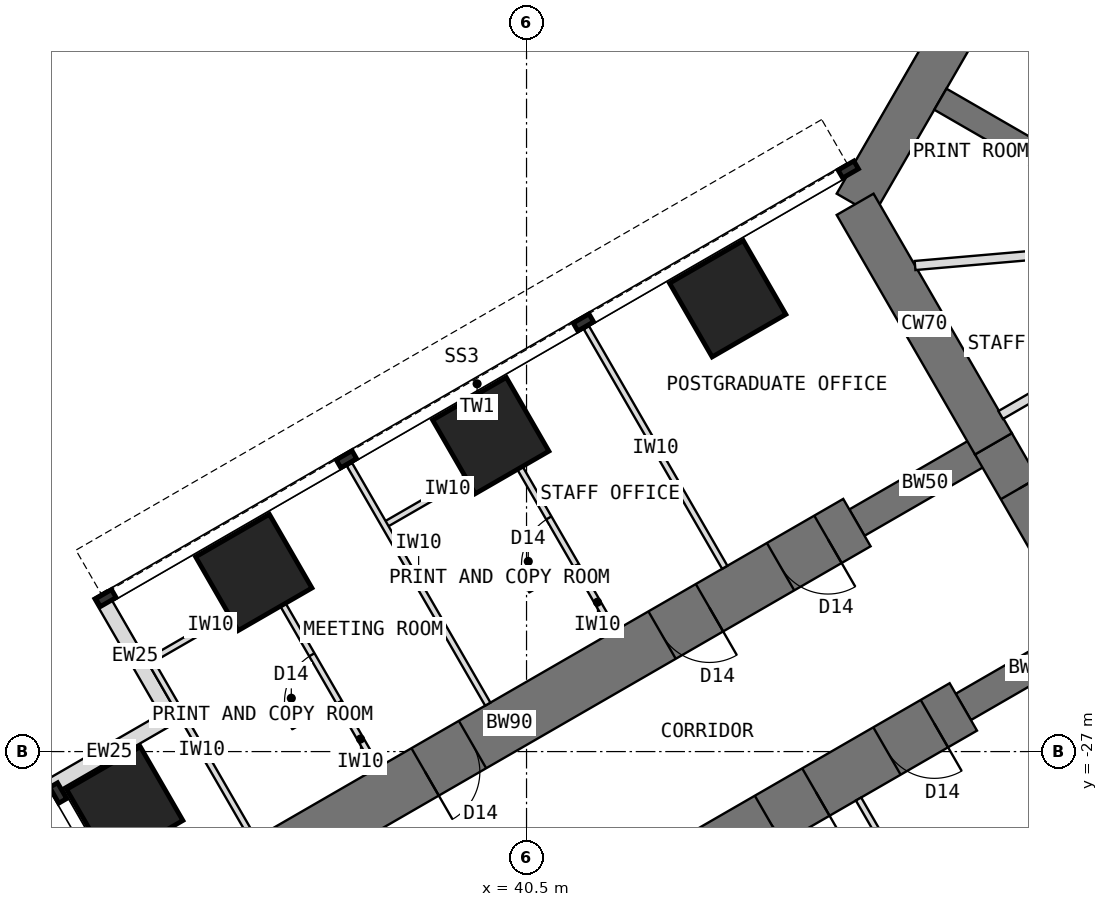
"""IFC4 building model, lengths in metres.
Left out: names, types, materials, properties, quantities, classifications, styles, units other than length and angle.
Written with IfcOpenShell. Run it as: python <this file> out.ifc"""

import sys

from ifc_helpers import new_model, si_unit, direction, frame, frame_2d, origin, origin_2d, place, context, subcontext, project, spatial, rectangle, extrude, element, fill, save


model = new_model("IFC4")
c1 = context("Model", 3, precision=1e-05, world=origin(), true_north=direction((0.0, 1.0)))
c2 = subcontext(c1, "Body", "Model", "MODEL_VIEW")
j1 = project(units=[si_unit("LENGTHUNIT", "METRE"), si_unit("PLANEANGLEUNIT", "RADIAN")], contexts=[c1])
p1 = place(None, origin())
s1 = spatial("IfcSite", under=j1, at=p1, CompositionType="ELEMENT")
p2 = place(p1, origin())
s2 = spatial("IfcBuilding", under=s1, at=p2, CompositionType="ELEMENT")
p3 = place(p2, frame((0.0, 0.0, 88.5)))
s3 = spatial("IfcBuildingStorey", under=s2, at=p3, CompositionType="ELEMENT", Elevation=88.5)
p4 = place(p3, frame((52.202, -7.092, 0.0), z_axis=(0.0, 0.0, 1.0), x_axis=(-0.500005998175, -0.866021940709, 0.0)))
e1 = element("IfcWall", 1, at=p4, inside=s3, PredefinedType="SHEAR", context=c2, shape_type="SweptSolid", body=[
    extrude(rectangle(XDim=12.596, YDim=0.7, at=frame_2d((6.298, 0.0))), origin(), (0.0, 0.0, 1.0), 4.0),
])
p5 = place(p3, frame((45.904, -18.0, 0.0), z_axis=(0.0, 0.0, 1.0), x_axis=(0.500024481964, -0.866011268655, 0.0)))
e2 = element("IfcWall", 2, at=p5, inside=s3, PredefinedType="SHEAR", context=c2, shape_type="SweptSolid", body=[
    extrude(rectangle(XDim=4.548, YDim=0.7, at=frame_2d((2.274, 0.0))), origin(), (0.0, 0.0, 1.0), 4.0),
])
p6 = place(p3, frame((48.178, -21.939, 0.0), z_axis=(0.0, 0.0, 1.0), x_axis=(0.500010275428, -0.866019471182, 0.0)))
e3 = element("IfcWall", 3, at=p6, inside=s3, PredefinedType="SHEAR", context=c2, shape_type="SweptSolid", body=[
    extrude(rectangle(XDim=3.5, YDim=0.7, at=frame_2d((1.75, 0.0))), origin(), (0.0, 0.0, 1.0), 4.0),
])
p7 = place(p6, frame((0.85, 0.0, 0.0)))
e4 = element("IfcOpeningElement", 4, at=p7, cuts=e3, PredefinedType="OPENING", context=c2, shape_type="SweptSolid", body=[
    extrude(rectangle(XDim=1.8, YDim=2.1, at=frame_2d((0.9, 1.05))), frame((0.0, 0.36, 0.0), z_axis=(0.0, -1.0, 0.0), x_axis=(1.0, 0.0, 0.0)), (0.0, 0.0, 1.0), 0.72),
])
p8 = place(p3, frame((49.928, -24.97, 0.0), z_axis=(0.0, 0.0, 1.0), x_axis=(-0.866031863473, -0.499988811324, 0.0)))
e5 = element("IfcWall", 5, at=p8, inside=s3, PredefinedType="SHEAR", context=c2, shape_type="SweptSolid", body=[
    extrude(rectangle(XDim=2.592, YDim=0.5, at=frame_2d((1.296, 0.0))), origin(), (0.0, 0.0, 1.0), 4.0),
])
p9 = place(p3, frame((47.684, -26.266, 0.0), z_axis=(0.0, 0.0, 1.0), x_axis=(-0.866027579429, -0.499996231654, 0.0)))
e6 = element("IfcWall", 6, at=p9, inside=s3, PredefinedType="SHEAR", context=c2, shape_type="SweptSolid", body=[
    extrude(rectangle(XDim=13.2, YDim=0.9, at=frame_2d((6.6, 0.0))), origin(), (0.0, 0.0, 1.0), 4.0),
])
p10 = place(p9, frame((0.55, 0.0, 0.0)))
e7 = element("IfcOpeningElement", 7, at=p10, cuts=e6, PredefinedType="OPENING", context=c2, shape_type="SweptSolid", body=[
    extrude(rectangle(XDim=0.9, YDim=2.1, at=frame_2d((0.45, 1.05))), frame((0.0, 0.46, 0.0), z_axis=(0.0, -1.0, 0.0), x_axis=(1.0, 0.0, 0.0)), (0.0, 0.0, 1.0), 0.92),
])
p11 = place(p9, frame((2.8, 0.0, 0.0)))
e8 = element("IfcOpeningElement", 8, at=p11, cuts=e6, PredefinedType="OPENING", context=c2, shape_type="SweptSolid", body=[
    extrude(rectangle(XDim=0.9, YDim=2.1, at=frame_2d((0.45, 1.05))), frame((0.0, 0.46, 0.0), z_axis=(0.0, -1.0, 0.0), x_axis=(1.0, 0.0, 0.0)), (0.0, 0.0, 1.0), 0.92),
])
p12 = place(p9, frame((7.3, 0.0, 0.0)))
e9 = element("IfcOpeningElement", 9, at=p12, cuts=e6, PredefinedType="OPENING", context=c2, shape_type="SweptSolid", body=[
    extrude(rectangle(XDim=0.9, YDim=2.1, at=frame_2d((0.45, 1.05))), frame((0.0, 0.46, 0.0), z_axis=(0.0, -1.0, 0.0), x_axis=(1.0, 0.0, 0.0)), (0.0, 0.0, 1.0), 0.92),
])
p13 = place(p3, frame((48.178, -21.939, 0.0), z_axis=(0.0, 0.0, 1.0), x_axis=(-0.866072649678, -0.499918158782, 0.0)))
e10 = element("IfcWall", 10, at=p13, inside=s3, PredefinedType="SHEAR", context=c2, shape_type="SweptSolid", body=[
    extrude(rectangle(XDim=2.592, YDim=0.5, at=frame_2d((1.296, 0.0))), origin(), (0.0, 0.0, 1.0), 4.0),
])
p14 = place(p3, frame((45.934, -23.234, 0.0), z_axis=(0.0, 0.0, 1.0), x_axis=(-0.866019570528, -0.500010103361, 0.0)))
e11 = element("IfcWall", 11, at=p14, inside=s3, PredefinedType="SHEAR", context=c2, shape_type="SweptSolid", body=[
    extrude(rectangle(XDim=13.2, YDim=0.9, at=frame_2d((6.6, 0.0))), origin(), (0.0, 0.0, 1.0), 4.0),
])
p15 = place(p14, frame((0.55, 0.0, 0.0)))
e12 = element("IfcOpeningElement", 12, at=p15, cuts=e11, PredefinedType="OPENING", context=c2, shape_type="SweptSolid", body=[
    extrude(rectangle(XDim=0.9, YDim=2.1, at=frame_2d((0.45, 1.05))), frame((0.0, 0.46, 0.0), z_axis=(0.0, -1.0, 0.0), x_axis=(1.0, 0.0, 0.0)), (0.0, 0.0, 1.0), 0.92),
])
p16 = place(p14, frame((2.8, 0.0, 0.0)))
e13 = element("IfcOpeningElement", 13, at=p16, cuts=e11, PredefinedType="OPENING", context=c2, shape_type="SweptSolid", body=[
    extrude(rectangle(XDim=0.9, YDim=2.1, at=frame_2d((0.45, 1.05))), frame((0.0, 0.46, 0.0), z_axis=(0.0, -1.0, 0.0), x_axis=(1.0, 0.0, 0.0)), (0.0, 0.0, 1.0), 0.92),
])
p17 = place(p14, frame((7.3, 0.0, 0.0)))
e14 = element("IfcOpeningElement", 14, at=p17, cuts=e11, PredefinedType="OPENING", context=c2, shape_type="SweptSolid", body=[
    extrude(rectangle(XDim=0.9, YDim=2.1, at=frame_2d((0.45, 1.05))), frame((0.0, 0.46, 0.0), z_axis=(0.0, -1.0, 0.0), x_axis=(1.0, 0.0, 0.0)), (0.0, 0.0, 1.0), 0.92),
])
for number, where, z_axis, x_axis in (
    (15, (43.809, -19.554, 0.0), (0.0, 0.0, 1.0), (0.866, 0.5, 0.0)),
    (16, (39.912, -21.804, 0.0), (0.0, 0.0, 1.0), (0.866, 0.5, 0.0)),
    (17, (36.014, -24.054, 0.0), (0.0, 0.0, 1.0), (0.866, 0.5, 0.0)),
    (18, (33.892, -27.877, 0.0), (0.0, 0.0, 1.0), (0.866, 0.5, 0.0)),
):
    element("IfcColumn", number, at=place(p3, frame(where, z_axis=z_axis, x_axis=x_axis)), inside=s3, PredefinedType="COLUMN", context=c2, shape_type="SweptSolid", body=[
        extrude(rectangle(XDim=1.4, YDim=1.4, at=origin_2d()), origin(), (0.0, 0.0, 1.0), 4.0),
    ])
for number, where, z_axis, x_axis in (
    (19, (33.483, -24.419, 0.0), (0.0, 0.0, 1.0), (0.5, -0.866, 0.0)),
    (20, (34.645, -26.432, 0.0), (0.0, 0.0, 1.0), (-0.866, -0.5, 0.0)),
):
    element("IfcWall", number, at=place(p3, frame(where, z_axis=z_axis, x_axis=x_axis)), inside=s3, PredefinedType="STANDARD", context=c2, shape_type="SweptSolid", body=[
        extrude(rectangle(XDim=2.325, YDim=0.25, at=frame_2d((1.163, 0.0))), origin(), (0.0, 0.0, 1.0), 3.7),
    ])
p18 = place(p3, frame((52.38, -19.201, 0.0), z_axis=(0.0, 0.0, 1.0), x_axis=(-0.866023886965, 0.500002627198, 0.0)))
e21 = element("IfcWall", 21, at=p18, inside=s3, PredefinedType="SHEAR", context=c2, shape_type="SweptSolid", body=[
    extrude(rectangle(XDim=5.858, YDim=0.4, at=frame_2d((2.929, 0.0))), origin(), (0.0, 0.0, 1.0), 4.0),
])
for number, where, z_axis, x_axis in (
    (22, (45.96, -27.78, 0.0), (0.0, 0.0, 1.0), (0.5, -0.866, 0.0)),
    (23, (43.76, -23.97, 0.0), (0.0, 0.0, 1.0), (-0.5, 0.866, 0.0)),
    (24, (39.863, -26.22, 0.0), (0.0, 0.0, 1.0), (-0.5, 0.866, 0.0)),
):
    element("IfcWall", number, at=place(p3, frame(where, z_axis=z_axis, x_axis=x_axis)), inside=s3, PredefinedType="PARTITIONING", context=c2, shape_type="SweptSolid", body=[
        extrude(rectangle(XDim=4.55, YDim=0.1, at=frame_2d((2.275, 0.0))), origin(), (0.0, 0.0, 1.0), 3.7),
    ])
p19 = place(p3, frame((40.241, -22.075, 0.0), z_axis=(0.0, 0.0, 1.0), x_axis=(-0.866024647952, -0.500001309137, 0.0)))
e25 = element("IfcWall", 25, at=p19, inside=s3, PredefinedType="PARTITIONING", context=c2, shape_type="SweptSolid", body=[
    extrude(rectangle(XDim=2.4, YDim=0.1, at=frame_2d((1.2, 0.0))), origin(), (0.0, 0.0, 1.0), 3.7),
])
p20 = place(p3, frame((41.941, -25.02, 0.0), z_axis=(0.0, 0.0, 1.0), x_axis=(-0.499977295307, 0.866038511948, 0.0)))
e26 = element("IfcWall", 26, at=p20, inside=s3, PredefinedType="PARTITIONING", context=c2, shape_type="SweptSolid", body=[
    extrude(rectangle(XDim=3.4, YDim=0.1, at=frame_2d((1.7, 0.0))), origin(), (0.0, 0.0, 1.0), 3.7),
])
p21 = place(p20, frame((1.25, 0.0, 0.0)))
e27 = element("IfcOpeningElement", 27, at=p21, cuts=e26, PredefinedType="OPENING", context=c2, shape_type="SweptSolid", body=[
    extrude(rectangle(XDim=0.9, YDim=2.1, at=frame_2d((0.45, 1.05))), frame((0.0, 0.06, 0.0), z_axis=(0.0, -1.0, 0.0), x_axis=(1.0, 0.0, 0.0)), (0.0, 0.0, 1.0), 0.12),
])
p22 = place(p3, frame((36.344, -24.325, 0.0), z_axis=(0.0, 0.0, 1.0), x_axis=(-0.866024647952, -0.500001309137, 0.0)))
e28 = element("IfcWall", 28, at=p22, inside=s3, PredefinedType="PARTITIONING", context=c2, shape_type="SweptSolid", body=[
    extrude(rectangle(XDim=2.4, YDim=0.1, at=frame_2d((1.2, 0.0))), origin(), (0.0, 0.0, 1.0), 3.7),
])
p23 = place(p3, frame((38.044, -27.27, 0.0), z_axis=(0.0, 0.0, 1.0), x_axis=(-0.500031147688, 0.866007419912, 0.0)))
e29 = element("IfcWall", 29, at=p23, inside=s3, PredefinedType="PARTITIONING", context=c2, shape_type="SweptSolid", body=[
    extrude(rectangle(XDim=3.4, YDim=0.1, at=frame_2d((1.7, 0.0))), origin(), (0.0, 0.0, 1.0), 3.7),
])
p24 = place(p23, frame((1.25, 0.0, 0.0)))
e30 = element("IfcOpeningElement", 30, at=p24, cuts=e29, PredefinedType="OPENING", context=c2, shape_type="SweptSolid", body=[
    extrude(rectangle(XDim=0.9, YDim=2.1, at=frame_2d((0.45, 1.05))), frame((0.0, 0.06, 0.0), z_axis=(0.0, -1.0, 0.0), x_axis=(1.0, 0.0, 0.0)), (0.0, 0.0, 1.0), 0.12),
])
p25 = place(p3, frame((36.009, -28.445, 0.0), z_axis=(0.0, 0.0, 1.0), x_axis=(-0.500031147688, 0.866007419912, 0.0)))
e31 = element("IfcWall", 31, at=p25, inside=s3, PredefinedType="PARTITIONING", context=c2, shape_type="SweptSolid", body=[
    extrude(rectangle(XDim=3.4, YDim=0.1, at=frame_2d((1.7, 0.0))), origin(), (0.0, 0.0, 1.0), 3.7),
])
p26 = place(p3, frame((48.298, -21.466, 0.0), z_axis=(0.0, 0.0, 1.0), x_axis=(0.866021148949, 0.500007369519, 0.0)))
e32 = element("IfcWall", 32, at=p26, inside=s3, PredefinedType="PARTITIONING", context=c2, shape_type="SweptSolid", body=[
    extrude(rectangle(XDim=4.426, YDim=0.15, at=frame_2d((2.213, 0.0))), origin(), (0.0, 0.0, 1.0), 3.7),
])
p27 = place(p26, frame((2.598, 0.0, 0.0)))
e33 = element("IfcOpeningElement", 33, at=p27, cuts=e32, PredefinedType="OPENING", context=c2, shape_type="SweptSolid", body=[
    extrude(rectangle(XDim=1.0, YDim=2.1, at=frame_2d((0.5, 1.05))), frame((0.0, 0.085, 0.0), z_axis=(0.0, -1.0, 0.0), x_axis=(1.0, 0.0, 0.0)), (0.0, 0.0, 1.0), 0.17),
])
p28 = place(p3, frame((51.371, -18.618, 0.0), z_axis=(0.0, 0.0, 1.0), x_axis=(-0.996259708579, -0.086409450071, 0.0)))
e34 = element("IfcWall", 34, at=p28, inside=s3, PredefinedType="PARTITIONING", context=c2, shape_type="SweptSolid", body=[
    extrude(rectangle(XDim=4.498, YDim=0.15, at=frame_2d((2.249, 0.0))), origin(), (0.0, 0.0, 1.0), 3.7),
])
p29 = place(p28, frame((0.849, 0.0, 0.0)))
e35 = element("IfcOpeningElement", 35, at=p29, cuts=e34, PredefinedType="OPENING", context=c2, shape_type="SweptSolid", body=[
    extrude(rectangle(XDim=1.0, YDim=2.1, at=frame_2d((0.5, 1.05))), frame((0.0, 0.085, 0.0), z_axis=(0.0, -1.0, 0.0), x_axis=(1.0, 0.0, 0.0)), (0.0, 0.0, 1.0), 0.17),
])
p30 = place(p7, origin())
e36 = element("IfcDoor", 36, at=p30, inside=s3, OperationType="DOUBLE_DOOR_DOUBLE_SWING", PredefinedType="DOOR", context=c2, shape_type="SweptSolid", body=[
    extrude(rectangle(XDim=1.72, YDim=2.06, at=frame_2d((0.9, 1.03))), frame((0.0, 0.025, 0.0), z_axis=(0.0, -1.0, 0.0), x_axis=(1.0, 0.0, 0.0)), (0.0, 0.0, 1.0), 0.05),
    extrude(rectangle(XDim=0.04, YDim=2.1, at=frame_2d((0.02, 1.05))), frame((0.0, 0.35, 0.0), z_axis=(0.0, -1.0, 0.0), x_axis=(1.0, 0.0, 0.0)), (0.0, 0.0, 1.0), 0.699),
    extrude(rectangle(XDim=0.04, YDim=2.1, at=frame_2d((1.78, 1.05))), frame((0.0, 0.35, 0.0), z_axis=(0.0, -1.0, 0.0), x_axis=(1.0, 0.0, 0.0)), (0.0, 0.0, 1.0), 0.699),
    extrude(rectangle(XDim=1.72, YDim=0.04, at=frame_2d((0.9, 2.08))), frame((0.0, 0.35, 0.0), z_axis=(0.0, -1.0, 0.0), x_axis=(1.0, 0.0, 0.0)), (0.0, 0.0, 1.0), 0.699),
])
fill(e4, e36)
p31 = place(p21, origin())
e37 = element("IfcDoor", 37, at=p31, inside=s3, OperationType="SINGLE_SWING_LEFT", PredefinedType="DOOR", context=c2, shape_type="SweptSolid", body=[
    extrude(rectangle(XDim=0.9, YDim=2.1, at=frame_2d((0.45, 1.05))), frame((0.0, 0.025, 0.0), z_axis=(0.0, -1.0, 0.0), x_axis=(1.0, 0.0, 0.0)), (0.0, 0.0, 1.0), 0.05),
])
fill(e27, e37)
p32 = place(p24, origin())
e38 = element("IfcDoor", 38, at=p32, inside=s3, OperationType="SINGLE_SWING_LEFT", PredefinedType="DOOR", context=c2, shape_type="SweptSolid", body=[
    extrude(rectangle(XDim=0.9, YDim=2.1, at=frame_2d((0.45, 1.05))), frame((0.0, 0.025, 0.0), z_axis=(0.0, -1.0, 0.0), x_axis=(1.0, 0.0, 0.0)), (0.0, 0.0, 1.0), 0.05),
])
fill(e30, e38)
p33 = place(p10, origin())
e39 = element("IfcDoor", 39, at=p33, inside=s3, OperationType="SINGLE_SWING_LEFT", PredefinedType="DOOR", context=c2, shape_type="SweptSolid", body=[
    extrude(rectangle(XDim=0.82, YDim=2.06, at=frame_2d((0.45, 1.03))), frame((0.0, 0.025, 0.0), z_axis=(0.0, -1.0, 0.0), x_axis=(1.0, 0.0, 0.0)), (0.0, 0.0, 1.0), 0.05),
    extrude(rectangle(XDim=0.04, YDim=2.1, at=frame_2d((0.02, 1.05))), frame((0.0, 0.45, 0.0), z_axis=(0.0, -1.0, 0.0), x_axis=(1.0, 0.0, 0.0)), (0.0, 0.0, 1.0), 0.899),
    extrude(rectangle(XDim=0.04, YDim=2.1, at=frame_2d((0.88, 1.05))), frame((0.0, 0.45, 0.0), z_axis=(0.0, -1.0, 0.0), x_axis=(1.0, 0.0, 0.0)), (0.0, 0.0, 1.0), 0.899),
    extrude(rectangle(XDim=0.82, YDim=0.04, at=frame_2d((0.45, 2.08))), frame((0.0, 0.45, 0.0), z_axis=(0.0, -1.0, 0.0), x_axis=(1.0, 0.0, 0.0)), (0.0, 0.0, 1.0), 0.899),
])
fill(e7, e39)
p34 = place(p11, origin())
e40 = element("IfcDoor", 40, at=p34, inside=s3, OperationType="SINGLE_SWING_LEFT", PredefinedType="DOOR", context=c2, shape_type="SweptSolid", body=[
    extrude(rectangle(XDim=0.82, YDim=2.06, at=frame_2d((0.45, 1.03))), frame((0.0, 0.025, 0.0), z_axis=(0.0, -1.0, 0.0), x_axis=(1.0, 0.0, 0.0)), (0.0, 0.0, 1.0), 0.05),
    extrude(rectangle(XDim=0.04, YDim=2.1, at=frame_2d((0.02, 1.05))), frame((0.0, 0.45, 0.0), z_axis=(0.0, -1.0, 0.0), x_axis=(1.0, 0.0, 0.0)), (0.0, 0.0, 1.0), 0.899),
    extrude(rectangle(XDim=0.04, YDim=2.1, at=frame_2d((0.88, 1.05))), frame((0.0, 0.45, 0.0), z_axis=(0.0, -1.0, 0.0), x_axis=(1.0, 0.0, 0.0)), (0.0, 0.0, 1.0), 0.899),
    extrude(rectangle(XDim=0.82, YDim=0.04, at=frame_2d((0.45, 2.08))), frame((0.0, 0.45, 0.0), z_axis=(0.0, -1.0, 0.0), x_axis=(1.0, 0.0, 0.0)), (0.0, 0.0, 1.0), 0.899),
])
fill(e8, e40)
p35 = place(p15, origin())
e41 = element("IfcDoor", 41, at=p35, inside=s3, OperationType="SINGLE_SWING_LEFT", PredefinedType="DOOR", context=c2, shape_type="SweptSolid", body=[
    extrude(rectangle(XDim=0.82, YDim=2.06, at=frame_2d((0.45, 1.03))), frame((0.0, 0.025, 0.0), z_axis=(0.0, -1.0, 0.0), x_axis=(1.0, 0.0, 0.0)), (0.0, 0.0, 1.0), 0.05),
    extrude(rectangle(XDim=0.04, YDim=2.1, at=frame_2d((0.02, 1.05))), frame((0.0, 0.45, 0.0), z_axis=(0.0, -1.0, 0.0), x_axis=(1.0, 0.0, 0.0)), (0.0, 0.0, 1.0), 0.899),
    extrude(rectangle(XDim=0.04, YDim=2.1, at=frame_2d((0.88, 1.05))), frame((0.0, 0.45, 0.0), z_axis=(0.0, -1.0, 0.0), x_axis=(1.0, 0.0, 0.0)), (0.0, 0.0, 1.0), 0.899),
    extrude(rectangle(XDim=0.82, YDim=0.04, at=frame_2d((0.45, 2.08))), frame((0.0, 0.45, 0.0), z_axis=(0.0, -1.0, 0.0), x_axis=(1.0, 0.0, 0.0)), (0.0, 0.0, 1.0), 0.899),
])
fill(e12, e41)
p36 = place(p16, origin())
e42 = element("IfcDoor", 42, at=p36, inside=s3, OperationType="SINGLE_SWING_LEFT", PredefinedType="DOOR", context=c2, shape_type="SweptSolid", body=[
    extrude(rectangle(XDim=0.82, YDim=2.06, at=frame_2d((0.45, 1.03))), frame((0.0, 0.025, 0.0), z_axis=(0.0, -1.0, 0.0), x_axis=(1.0, 0.0, 0.0)), (0.0, 0.0, 1.0), 0.05),
    extrude(rectangle(XDim=0.04, YDim=2.1, at=frame_2d((0.02, 1.05))), frame((0.0, 0.45, 0.0), z_axis=(0.0, -1.0, 0.0), x_axis=(1.0, 0.0, 0.0)), (0.0, 0.0, 1.0), 0.899),
    extrude(rectangle(XDim=0.04, YDim=2.1, at=frame_2d((0.88, 1.05))), frame((0.0, 0.45, 0.0), z_axis=(0.0, -1.0, 0.0), x_axis=(1.0, 0.0, 0.0)), (0.0, 0.0, 1.0), 0.899),
    extrude(rectangle(XDim=0.82, YDim=0.04, at=frame_2d((0.45, 2.08))), frame((0.0, 0.45, 0.0), z_axis=(0.0, -1.0, 0.0), x_axis=(1.0, 0.0, 0.0)), (0.0, 0.0, 1.0), 0.899),
])
fill(e13, e42)
p37 = place(p17, origin())
e43 = element("IfcDoor", 43, at=p37, inside=s3, OperationType="SINGLE_SWING_RIGHT", PredefinedType="DOOR", context=c2, shape_type="SweptSolid", body=[
    extrude(rectangle(XDim=0.82, YDim=2.06, at=frame_2d((0.45, 1.03))), frame((0.0, 0.025, 0.0), z_axis=(0.0, -1.0, 0.0), x_axis=(1.0, 0.0, 0.0)), (0.0, 0.0, 1.0), 0.05),
    extrude(rectangle(XDim=0.04, YDim=2.1, at=frame_2d((0.02, 1.05))), frame((0.0, 0.45, 0.0), z_axis=(0.0, -1.0, 0.0), x_axis=(1.0, 0.0, 0.0)), (0.0, 0.0, 1.0), 0.899),
    extrude(rectangle(XDim=0.04, YDim=2.1, at=frame_2d((0.88, 1.05))), frame((0.0, 0.45, 0.0), z_axis=(0.0, -1.0, 0.0), x_axis=(1.0, 0.0, 0.0)), (0.0, 0.0, 1.0), 0.899),
    extrude(rectangle(XDim=0.82, YDim=0.04, at=frame_2d((0.45, 2.08))), frame((0.0, 0.45, 0.0), z_axis=(0.0, -1.0, 0.0), x_axis=(1.0, 0.0, 0.0)), (0.0, 0.0, 1.0), 0.899),
])
fill(e14, e43)
save(model, sys.argv[1])
